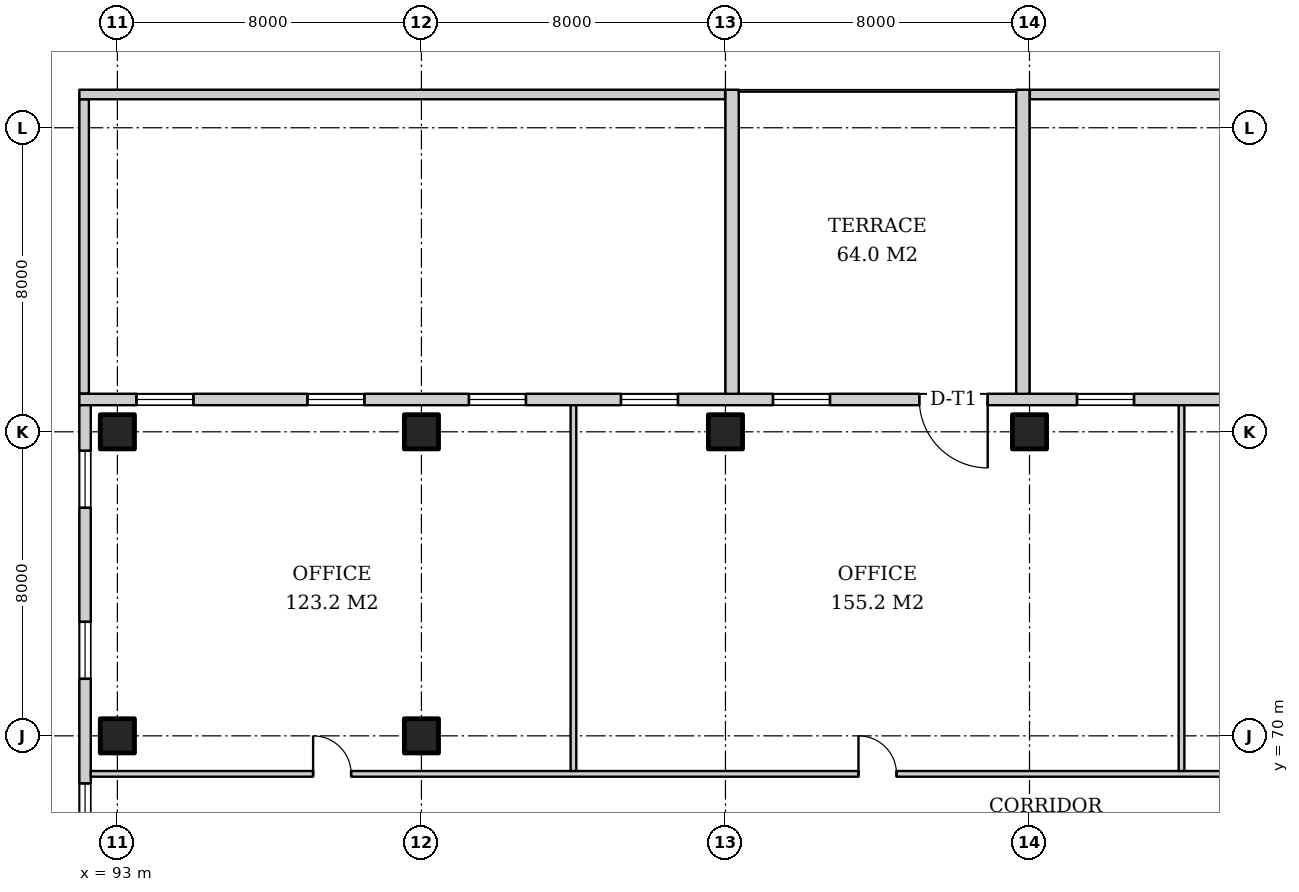
"""IFC4 building model, lengths in metres.
Left out: names, types, materials, properties, quantities, classifications, styles, units other than length and angle.
Written with IfcOpenShell. Run it as: python <this file> out.ifc"""

import sys

from ifc_helpers import new_model, si_unit, direction, frame, frame_2d, origin, origin_2d, place, context, subcontext, project, spatial, rectangle, extrude, element, fill, save


model = new_model("IFC4")
c1 = context("Model", 3, precision=1e-05, world=origin(), true_north=direction((0.0, 1.0)))
c2 = subcontext(c1, "Body", "Model", "MODEL_VIEW")
j1 = project(units=[si_unit("LENGTHUNIT", "METRE"), si_unit("PLANEANGLEUNIT", "RADIAN")], contexts=[c1])
p1 = place(None, origin())
s1 = spatial("IfcSite", under=j1, at=p1, CompositionType="ELEMENT")
p2 = place(p1, origin())
s2 = spatial("IfcBuilding", under=s1, at=p2, CompositionType="ELEMENT")
p3 = place(p2, frame((0.0, 0.0, 11.0)))
s3 = spatial("IfcBuildingStorey", under=s2, at=p3, CompositionType="ELEMENT", Elevation=11.0)
for number, where, z_axis, x_axis in (
    (1, (93.0, 70.0, 0.0), (0.0, 0.0, 1.0), (1.0, 0.0, 0.0)),
    (2, (93.0, 78.0, 0.0), (0.0, 0.0, 1.0), (1.0, 0.0, 0.0)),
    (3, (101.0, 70.0, 0.0), (0.0, 0.0, 1.0), (1.0, 0.0, 0.0)),
    (4, (101.0, 78.0, 0.0), (0.0, 0.0, 1.0), (1.0, 0.0, 0.0)),
    (5, (109.0, 78.0, 0.0), (0.0, 0.0, 1.0), (1.0, 0.0, 0.0)),
    (6, (117.0, 78.0, 0.0), (0.0, 0.0, 1.0), (1.0, 0.0, 0.0)),
):
    element("IfcColumn", number, at=place(p3, frame(where, z_axis=z_axis, x_axis=x_axis)), inside=s3, PredefinedType="COLUMN", context=c2, shape_type="SweptSolid", body=[
        extrude(rectangle(XDim=0.9, YDim=0.9, at=origin_2d()), origin(), (0.0, 0.0, 1.0), 5.0),
    ])
p4 = place(p3, frame((142.0, 78.85, 0.0), z_axis=(0.0, 0.0, 1.0), x_axis=(-1.0, 0.0, 0.0)))
e7 = element("IfcWall", 7, at=p4, inside=s3, PredefinedType="SOLIDWALL", context=c2, shape_type="SweptSolid", body=[
    extrude(rectangle(XDim=50.0, YDim=0.3, at=frame_2d((25.0, 0.0))), origin(), (0.0, 0.0, 1.0), 4.7),
])
p5 = place(p4, frame((1.5, 0.0, 0.9)))
e8 = element("IfcOpeningElement", 8, at=p5, cuts=e7, PredefinedType="OPENING", context=c2, shape_type="SweptSolid", body=[
    extrude(rectangle(XDim=1.5, YDim=3.2, at=frame_2d((0.75, 1.6))), frame((0.0, 0.16, 0.0), z_axis=(0.0, -1.0, 0.0), x_axis=(1.0, 0.0, 0.0)), (0.0, 0.0, 1.0), 0.32),
])
p6 = place(p4, frame((6.0, 0.0, 0.9)))
e9 = element("IfcOpeningElement", 9, at=p6, cuts=e7, PredefinedType="OPENING", context=c2, shape_type="SweptSolid", body=[
    extrude(rectangle(XDim=1.5, YDim=3.2, at=frame_2d((0.75, 1.6))), frame((0.0, 0.16, 0.0), z_axis=(0.0, -1.0, 0.0), x_axis=(1.0, 0.0, 0.0)), (0.0, 0.0, 1.0), 0.32),
])
p7 = place(p4, frame((10.25, 0.0, 0.9)))
e10 = element("IfcOpeningElement", 10, at=p7, cuts=e7, PredefinedType="OPENING", context=c2, shape_type="SweptSolid", body=[
    extrude(rectangle(XDim=1.5, YDim=3.2, at=frame_2d((0.75, 1.6))), frame((0.0, 0.16, 0.0), z_axis=(0.0, -1.0, 0.0), x_axis=(1.0, 0.0, 0.0)), (0.0, 0.0, 1.0), 0.32),
])
p8 = place(p4, frame((14.25, 0.0, 0.9)))
e11 = element("IfcOpeningElement", 11, at=p8, cuts=e7, PredefinedType="OPENING", context=c2, shape_type="SweptSolid", body=[
    extrude(rectangle(XDim=1.5, YDim=3.2, at=frame_2d((0.75, 1.6))), frame((0.0, 0.16, 0.0), z_axis=(0.0, -1.0, 0.0), x_axis=(1.0, 0.0, 0.0)), (0.0, 0.0, 1.0), 0.32),
])
p9 = place(p4, frame((18.25, 0.0, 0.9)))
e12 = element("IfcOpeningElement", 12, at=p9, cuts=e7, PredefinedType="OPENING", context=c2, shape_type="SweptSolid", body=[
    extrude(rectangle(XDim=1.5, YDim=3.2, at=frame_2d((0.75, 1.6))), frame((0.0, 0.16, 0.0), z_axis=(0.0, -1.0, 0.0), x_axis=(1.0, 0.0, 0.0)), (0.0, 0.0, 1.0), 0.32),
])
p10 = place(p4, frame((22.25, 0.0, 0.9)))
e13 = element("IfcOpeningElement", 13, at=p10, cuts=e7, PredefinedType="OPENING", context=c2, shape_type="SweptSolid", body=[
    extrude(rectangle(XDim=1.5, YDim=3.2, at=frame_2d((0.75, 1.6))), frame((0.0, 0.16, 0.0), z_axis=(0.0, -1.0, 0.0), x_axis=(1.0, 0.0, 0.0)), (0.0, 0.0, 1.0), 0.32),
])
p11 = place(p4, frame((26.1, 0.0, 0.0)))
e14 = element("IfcOpeningElement", 14, at=p11, cuts=e7, PredefinedType="OPENING", context=c2, shape_type="SweptSolid", body=[
    extrude(rectangle(XDim=1.8, YDim=2.4, at=frame_2d((0.9, 1.2))), frame((0.0, 0.16, 0.0), z_axis=(0.0, -1.0, 0.0), x_axis=(1.0, 0.0, 0.0)), (0.0, 0.0, 1.0), 0.32),
])
p12 = place(p4, frame((30.25, 0.0, 0.9)))
e15 = element("IfcOpeningElement", 15, at=p12, cuts=e7, PredefinedType="OPENING", context=c2, shape_type="SweptSolid", body=[
    extrude(rectangle(XDim=1.5, YDim=3.2, at=frame_2d((0.75, 1.6))), frame((0.0, 0.16, 0.0), z_axis=(0.0, -1.0, 0.0), x_axis=(1.0, 0.0, 0.0)), (0.0, 0.0, 1.0), 0.32),
])
p13 = place(p4, frame((34.25, 0.0, 0.9)))
e16 = element("IfcOpeningElement", 16, at=p13, cuts=e7, PredefinedType="OPENING", context=c2, shape_type="SweptSolid", body=[
    extrude(rectangle(XDim=1.5, YDim=3.2, at=frame_2d((0.75, 1.6))), frame((0.0, 0.16, 0.0), z_axis=(0.0, -1.0, 0.0), x_axis=(1.0, 0.0, 0.0)), (0.0, 0.0, 1.0), 0.32),
])
p14 = place(p4, frame((38.25, 0.0, 0.9)))
e17 = element("IfcOpeningElement", 17, at=p14, cuts=e7, PredefinedType="OPENING", context=c2, shape_type="SweptSolid", body=[
    extrude(rectangle(XDim=1.5, YDim=3.2, at=frame_2d((0.75, 1.6))), frame((0.0, 0.16, 0.0), z_axis=(0.0, -1.0, 0.0), x_axis=(1.0, 0.0, 0.0)), (0.0, 0.0, 1.0), 0.32),
])
p15 = place(p4, frame((42.5, 0.0, 0.9)))
e18 = element("IfcOpeningElement", 18, at=p15, cuts=e7, PredefinedType="OPENING", context=c2, shape_type="SweptSolid", body=[
    extrude(rectangle(XDim=1.5, YDim=3.2, at=frame_2d((0.75, 1.6))), frame((0.0, 0.16, 0.0), z_axis=(0.0, -1.0, 0.0), x_axis=(1.0, 0.0, 0.0)), (0.0, 0.0, 1.0), 0.32),
])
p16 = place(p4, frame((47.0, 0.0, 0.9)))
e19 = element("IfcOpeningElement", 19, at=p16, cuts=e7, PredefinedType="OPENING", context=c2, shape_type="SweptSolid", body=[
    extrude(rectangle(XDim=1.5, YDim=3.2, at=frame_2d((0.75, 1.6))), frame((0.0, 0.16, 0.0), z_axis=(0.0, -1.0, 0.0), x_axis=(1.0, 0.0, 0.0)), (0.0, 0.0, 1.0), 0.32),
])
p17 = place(p3, frame((92.15, 78.7, 0.0), z_axis=(0.0, 0.0, 1.0), x_axis=(0.0, -1.0, 0.0)))
e20 = element("IfcWall", 20, at=p17, inside=s3, PredefinedType="SOLIDWALL", context=c2, shape_type="SweptSolid", body=[
    extrude(rectangle(XDim=57.4, YDim=0.3, at=frame_2d((28.7, 0.0))), origin(), (0.0, 0.0, 1.0), 4.7),
])
p18 = place(p17, frame((1.2, 0.0, 0.9)))
e21 = element("IfcOpeningElement", 21, at=p18, cuts=e20, PredefinedType="OPENING", context=c2, shape_type="SweptSolid", body=[
    extrude(rectangle(XDim=1.5, YDim=3.2, at=frame_2d((0.75, 1.6))), frame((0.0, 0.16, 0.0), z_axis=(0.0, -1.0, 0.0), x_axis=(1.0, 0.0, 0.0)), (0.0, 0.0, 1.0), 0.32),
])
p19 = place(p17, frame((5.7, 0.0, 0.9)))
e22 = element("IfcOpeningElement", 22, at=p19, cuts=e20, PredefinedType="OPENING", context=c2, shape_type="SweptSolid", body=[
    extrude(rectangle(XDim=1.5, YDim=3.2, at=frame_2d((0.75, 1.6))), frame((0.0, 0.16, 0.0), z_axis=(0.0, -1.0, 0.0), x_axis=(1.0, 0.0, 0.0)), (0.0, 0.0, 1.0), 0.32),
])
p20 = place(p17, frame((9.95, 0.0, 0.9)))
e23 = element("IfcOpeningElement", 23, at=p20, cuts=e20, PredefinedType="OPENING", context=c2, shape_type="SweptSolid", body=[
    extrude(rectangle(XDim=1.5, YDim=3.2, at=frame_2d((0.75, 1.6))), frame((0.0, 0.16, 0.0), z_axis=(0.0, -1.0, 0.0), x_axis=(1.0, 0.0, 0.0)), (0.0, 0.0, 1.0), 0.32),
])
p21 = place(p17, frame((13.95, 0.0, 0.9)))
e24 = element("IfcOpeningElement", 24, at=p21, cuts=e20, PredefinedType="OPENING", context=c2, shape_type="SweptSolid", body=[
    extrude(rectangle(XDim=1.5, YDim=3.2, at=frame_2d((0.75, 1.6))), frame((0.0, 0.16, 0.0), z_axis=(0.0, -1.0, 0.0), x_axis=(1.0, 0.0, 0.0)), (0.0, 0.0, 1.0), 0.32),
])
p22 = place(p17, frame((17.95, 0.0, 0.9)))
e25 = element("IfcOpeningElement", 25, at=p22, cuts=e20, PredefinedType="OPENING", context=c2, shape_type="SweptSolid", body=[
    extrude(rectangle(XDim=1.5, YDim=3.2, at=frame_2d((0.75, 1.6))), frame((0.0, 0.16, 0.0), z_axis=(0.0, -1.0, 0.0), x_axis=(1.0, 0.0, 0.0)), (0.0, 0.0, 1.0), 0.32),
])
p23 = place(p17, frame((21.95, 0.0, 0.9)))
e26 = element("IfcOpeningElement", 26, at=p23, cuts=e20, PredefinedType="OPENING", context=c2, shape_type="SweptSolid", body=[
    extrude(rectangle(XDim=1.5, YDim=3.2, at=frame_2d((0.75, 1.6))), frame((0.0, 0.16, 0.0), z_axis=(0.0, -1.0, 0.0), x_axis=(1.0, 0.0, 0.0)), (0.0, 0.0, 1.0), 0.32),
])
p24 = place(p17, frame((25.95, 0.0, 0.9)))
e27 = element("IfcOpeningElement", 27, at=p24, cuts=e20, PredefinedType="OPENING", context=c2, shape_type="SweptSolid", body=[
    extrude(rectangle(XDim=1.5, YDim=3.2, at=frame_2d((0.75, 1.6))), frame((0.0, 0.16, 0.0), z_axis=(0.0, -1.0, 0.0), x_axis=(1.0, 0.0, 0.0)), (0.0, 0.0, 1.0), 0.32),
])
p25 = place(p17, frame((29.95, 0.0, 0.9)))
e28 = element("IfcOpeningElement", 28, at=p25, cuts=e20, PredefinedType="OPENING", context=c2, shape_type="SweptSolid", body=[
    extrude(rectangle(XDim=1.5, YDim=3.2, at=frame_2d((0.75, 1.6))), frame((0.0, 0.16, 0.0), z_axis=(0.0, -1.0, 0.0), x_axis=(1.0, 0.0, 0.0)), (0.0, 0.0, 1.0), 0.32),
])
p26 = place(p17, frame((41.95, 0.0, 0.9)))
e29 = element("IfcOpeningElement", 29, at=p26, cuts=e20, PredefinedType="OPENING", context=c2, shape_type="SweptSolid", body=[
    extrude(rectangle(XDim=1.5, YDim=3.2, at=frame_2d((0.75, 1.6))), frame((0.0, 0.16, 0.0), z_axis=(0.0, -1.0, 0.0), x_axis=(1.0, 0.0, 0.0)), (0.0, 0.0, 1.0), 0.32),
])
p27 = place(p17, frame((45.95, 0.0, 0.9)))
e30 = element("IfcOpeningElement", 30, at=p27, cuts=e20, PredefinedType="OPENING", context=c2, shape_type="SweptSolid", body=[
    extrude(rectangle(XDim=1.5, YDim=3.2, at=frame_2d((0.75, 1.6))), frame((0.0, 0.16, 0.0), z_axis=(0.0, -1.0, 0.0), x_axis=(1.0, 0.0, 0.0)), (0.0, 0.0, 1.0), 0.32),
])
p28 = place(p17, frame((50.2, 0.0, 0.9)))
e31 = element("IfcOpeningElement", 31, at=p28, cuts=e20, PredefinedType="OPENING", context=c2, shape_type="SweptSolid", body=[
    extrude(rectangle(XDim=1.5, YDim=3.2, at=frame_2d((0.75, 1.6))), frame((0.0, 0.16, 0.0), z_axis=(0.0, -1.0, 0.0), x_axis=(1.0, 0.0, 0.0)), (0.0, 0.0, 1.0), 0.32),
])
p29 = place(p17, frame((54.7, 0.0, 0.9)))
e32 = element("IfcOpeningElement", 32, at=p29, cuts=e20, PredefinedType="OPENING", context=c2, shape_type="SweptSolid", body=[
    extrude(rectangle(XDim=1.5, YDim=3.2, at=frame_2d((0.75, 1.6))), frame((0.0, 0.16, 0.0), z_axis=(0.0, -1.0, 0.0), x_axis=(1.0, 0.0, 0.0)), (0.0, 0.0, 1.0), 0.32),
])
p30 = place(p17, frame((33.285, 0.0, 0.0)))
e33 = element("IfcOpeningElement", 33, at=p30, cuts=e20, PredefinedType="OPENING", context=c2, shape_type="SweptSolid", body=[
    extrude(rectangle(XDim=2.0, YDim=2.4, at=frame_2d((1.0, 1.2))), frame((0.0, 0.16, 0.0), z_axis=(0.0, -1.0, 0.0), x_axis=(1.0, 0.0, 0.0)), (0.0, 0.0, 1.0), 0.32),
])
p31 = place(p3, frame((92.125, 79.01, 0.0), z_axis=(0.0, 0.0, 1.0), x_axis=(0.0, 1.0, 0.0)))
e34 = element("IfcWall", 34, at=p31, inside=s3, PredefinedType="PARAPET", context=c2, shape_type="SweptSolid", body=[
    extrude(rectangle(XDim=7.74, YDim=0.25, at=frame_2d((3.87, 0.0))), origin(), (0.0, 0.0, 1.0), 1.1),
])
p32 = place(p3, frame((92.0, 86.875, 0.0), z_axis=(0.0, 0.0, 1.0), x_axis=(1.0, 0.0, 0.0)))
e35 = element("IfcWall", 35, at=p32, inside=s3, PredefinedType="PARAPET", context=c2, shape_type="SweptSolid", body=[
    extrude(rectangle(XDim=16.99, YDim=0.25, at=frame_2d((8.495, 0.0))), origin(), (0.0, 0.0, 1.0), 1.1),
])
p33 = place(p3, frame((117.01, 86.875, 0.0), z_axis=(0.0, 0.0, 1.0), x_axis=(1.0, 0.0, 0.0)))
e36 = element("IfcWall", 36, at=p33, inside=s3, PredefinedType="PARAPET", context=c2, shape_type="SweptSolid", body=[
    extrude(rectangle(XDim=24.99, YDim=0.25, at=frame_2d((12.495, 0.0))), origin(), (0.0, 0.0, 1.0), 1.1),
])
for number, where, z_axis, x_axis in (
    (37, (109.175, 79.0, 0.0), (0.0, 0.0, 1.0), (0.0, 1.0, 0.0)),
    (38, (116.825, 79.0, 0.0), (0.0, 0.0, 1.0), (0.0, 1.0, 0.0)),
):
    element("IfcWall", number, at=place(p3, frame(where, z_axis=z_axis, x_axis=x_axis)), inside=s3, PredefinedType="PARAPET", context=c2, shape_type="SweptSolid", body=[
        extrude(rectangle(XDim=8.0, YDim=0.35, at=frame_2d((4.0, 0.0))), origin(), (0.0, 0.0, 1.0), 1.1),
    ])
p34 = place(p3, frame((92.3, 69.0, 0.0), z_axis=(0.0, 0.0, 1.0), x_axis=(1.0, 0.0, 0.0)))
e39 = element("IfcWall", 39, at=p34, inside=s3, PredefinedType="PARTITIONING", context=c2, shape_type="SweptSolid", body=[
    extrude(rectangle(XDim=49.4, YDim=0.15, at=frame_2d((24.7, 0.0))), origin(), (0.0, 0.0, 1.0), 3.2),
])
p35 = place(p34, frame((5.85, 0.0, 0.0)))
e40 = element("IfcOpeningElement", 40, at=p35, cuts=e39, PredefinedType="OPENING", context=c2, shape_type="SweptSolid", body=[
    extrude(rectangle(XDim=1.0, YDim=2.1, at=frame_2d((0.5, 1.05))), frame((0.0, 0.085, 0.0), z_axis=(0.0, -1.0, 0.0), x_axis=(1.0, 0.0, 0.0)), (0.0, 0.0, 1.0), 0.17),
])
p36 = place(p34, frame((20.2, 0.0, 0.0)))
e41 = element("IfcOpeningElement", 41, at=p36, cuts=e39, PredefinedType="OPENING", context=c2, shape_type="SweptSolid", body=[
    extrude(rectangle(XDim=1.0, YDim=2.1, at=frame_2d((0.5, 1.05))), frame((0.0, 0.085, 0.0), z_axis=(0.0, -1.0, 0.0), x_axis=(1.0, 0.0, 0.0)), (0.0, 0.0, 1.0), 0.17),
])
p37 = place(p34, frame((38.55, 0.0, 0.0)))
e42 = element("IfcOpeningElement", 42, at=p37, cuts=e39, PredefinedType="OPENING", context=c2, shape_type="SweptSolid", body=[
    extrude(rectangle(XDim=1.0, YDim=2.1, at=frame_2d((0.5, 1.05))), frame((0.0, 0.085, 0.0), z_axis=(0.0, -1.0, 0.0), x_axis=(1.0, 0.0, 0.0)), (0.0, 0.0, 1.0), 0.17),
])
for number, where, z_axis, x_axis in (
    (43, (105.0, 69.075, 0.0), (0.0, 0.0, 1.0), (0.0, 1.0, 0.0)),
    (44, (121.0, 69.075, 0.0), (0.0, 0.0, 1.0), (0.0, 1.0, 0.0)),
):
    element("IfcWall", number, at=place(p3, frame(where, z_axis=z_axis, x_axis=x_axis)), inside=s3, PredefinedType="PARTITIONING", context=c2, shape_type="SweptSolid", body=[
        extrude(rectangle(XDim=9.625, YDim=0.15, at=frame_2d((4.812, 0.0))), origin(), (0.0, 0.0, 1.0), 3.2),
    ])
p38 = place(p10, origin())
e45 = element("IfcWindow", 45, at=p38, inside=s3, PartitioningType="SINGLE_PANEL", PredefinedType="WINDOW", context=c2, shape_type="SweptSolid", body=[
    extrude(rectangle(XDim=1.5, YDim=3.2, at=frame_2d((0.75, 1.6))), frame((0.0, 0.03, 0.0), z_axis=(0.0, -1.0, 0.0), x_axis=(1.0, 0.0, 0.0)), (0.0, 0.0, 1.0), 0.06),
])
fill(e13, e45)
p39 = place(p11, origin())
e46 = element("IfcDoor", 46, at=p39, inside=s3, OperationType="DOUBLE_DOOR_SINGLE_SWING", PredefinedType="DOOR", context=c2, shape_type="SweptSolid", body=[
    extrude(rectangle(XDim=1.8, YDim=2.4, at=frame_2d((0.9, 1.2))), frame((0.0, 0.025, 0.0), z_axis=(0.0, -1.0, 0.0), x_axis=(1.0, 0.0, 0.0)), (0.0, 0.0, 1.0), 0.05),
])
fill(e14, e46)
p40 = place(p12, origin())
e47 = element("IfcWindow", 47, at=p40, inside=s3, PartitioningType="SINGLE_PANEL", PredefinedType="WINDOW", context=c2, shape_type="SweptSolid", body=[
    extrude(rectangle(XDim=1.5, YDim=3.2, at=frame_2d((0.75, 1.6))), frame((0.0, 0.03, 0.0), z_axis=(0.0, -1.0, 0.0), x_axis=(1.0, 0.0, 0.0)), (0.0, 0.0, 1.0), 0.06),
])
fill(e15, e47)
p41 = place(p13, origin())
e48 = element("IfcWindow", 48, at=p41, inside=s3, PartitioningType="SINGLE_PANEL", PredefinedType="WINDOW", context=c2, shape_type="SweptSolid", body=[
    extrude(rectangle(XDim=1.5, YDim=3.2, at=frame_2d((0.75, 1.6))), frame((0.0, 0.03, 0.0), z_axis=(0.0, -1.0, 0.0), x_axis=(1.0, 0.0, 0.0)), (0.0, 0.0, 1.0), 0.06),
])
fill(e16, e48)
p42 = place(p14, origin())
e49 = element("IfcWindow", 49, at=p42, inside=s3, PartitioningType="SINGLE_PANEL", PredefinedType="WINDOW", context=c2, shape_type="SweptSolid", body=[
    extrude(rectangle(XDim=1.5, YDim=3.2, at=frame_2d((0.75, 1.6))), frame((0.0, 0.03, 0.0), z_axis=(0.0, -1.0, 0.0), x_axis=(1.0, 0.0, 0.0)), (0.0, 0.0, 1.0), 0.06),
])
fill(e17, e49)
p43 = place(p15, origin())
e50 = element("IfcWindow", 50, at=p43, inside=s3, PartitioningType="SINGLE_PANEL", PredefinedType="WINDOW", context=c2, shape_type="SweptSolid", body=[
    extrude(rectangle(XDim=1.5, YDim=3.2, at=frame_2d((0.75, 1.6))), frame((0.0, 0.03, 0.0), z_axis=(0.0, -1.0, 0.0), x_axis=(1.0, 0.0, 0.0)), (0.0, 0.0, 1.0), 0.06),
])
fill(e18, e50)
p44 = place(p16, origin())
e51 = element("IfcWindow", 51, at=p44, inside=s3, PartitioningType="SINGLE_PANEL", PredefinedType="WINDOW", context=c2, shape_type="SweptSolid", body=[
    extrude(rectangle(XDim=1.5, YDim=3.2, at=frame_2d((0.75, 1.6))), frame((0.0, 0.03, 0.0), z_axis=(0.0, -1.0, 0.0), x_axis=(1.0, 0.0, 0.0)), (0.0, 0.0, 1.0), 0.06),
])
fill(e19, e51)
p45 = place(p18, origin())
e52 = element("IfcWindow", 52, at=p45, inside=s3, PartitioningType="SINGLE_PANEL", PredefinedType="WINDOW", context=c2, shape_type="SweptSolid", body=[
    extrude(rectangle(XDim=1.5, YDim=3.2, at=frame_2d((0.75, 1.6))), frame((0.0, 0.03, 0.0), z_axis=(0.0, -1.0, 0.0), x_axis=(1.0, 0.0, 0.0)), (0.0, 0.0, 1.0), 0.06),
])
fill(e21, e52)
p46 = place(p19, origin())
e53 = element("IfcWindow", 53, at=p46, inside=s3, PartitioningType="SINGLE_PANEL", PredefinedType="WINDOW", context=c2, shape_type="SweptSolid", body=[
    extrude(rectangle(XDim=1.5, YDim=3.2, at=frame_2d((0.75, 1.6))), frame((0.0, 0.03, 0.0), z_axis=(0.0, -1.0, 0.0), x_axis=(1.0, 0.0, 0.0)), (0.0, 0.0, 1.0), 0.06),
])
fill(e22, e53)
p47 = place(p20, origin())
e54 = element("IfcWindow", 54, at=p47, inside=s3, PartitioningType="SINGLE_PANEL", PredefinedType="WINDOW", context=c2, shape_type="SweptSolid", body=[
    extrude(rectangle(XDim=1.5, YDim=3.2, at=frame_2d((0.75, 1.6))), frame((0.0, 0.03, 0.0), z_axis=(0.0, -1.0, 0.0), x_axis=(1.0, 0.0, 0.0)), (0.0, 0.0, 1.0), 0.06),
])
fill(e23, e54)
p48 = place(p35, origin())
e55 = element("IfcDoor", 55, at=p48, inside=s3, OperationType="SINGLE_SWING_LEFT", PredefinedType="DOOR", context=c2, shape_type="SweptSolid", body=[
    extrude(rectangle(XDim=1.0, YDim=2.1, at=frame_2d((0.5, 1.05))), frame((0.0, 0.025, 0.0), z_axis=(0.0, -1.0, 0.0), x_axis=(1.0, 0.0, 0.0)), (0.0, 0.0, 1.0), 0.05),
])
fill(e40, e55)
p49 = place(p36, origin())
e56 = element("IfcDoor", 56, at=p49, inside=s3, OperationType="SINGLE_SWING_LEFT", PredefinedType="DOOR", context=c2, shape_type="SweptSolid", body=[
    extrude(rectangle(XDim=1.0, YDim=2.1, at=frame_2d((0.5, 1.05))), frame((0.0, 0.025, 0.0), z_axis=(0.0, -1.0, 0.0), x_axis=(1.0, 0.0, 0.0)), (0.0, 0.0, 1.0), 0.05),
])
fill(e41, e56)
save(model, sys.argv[1])
